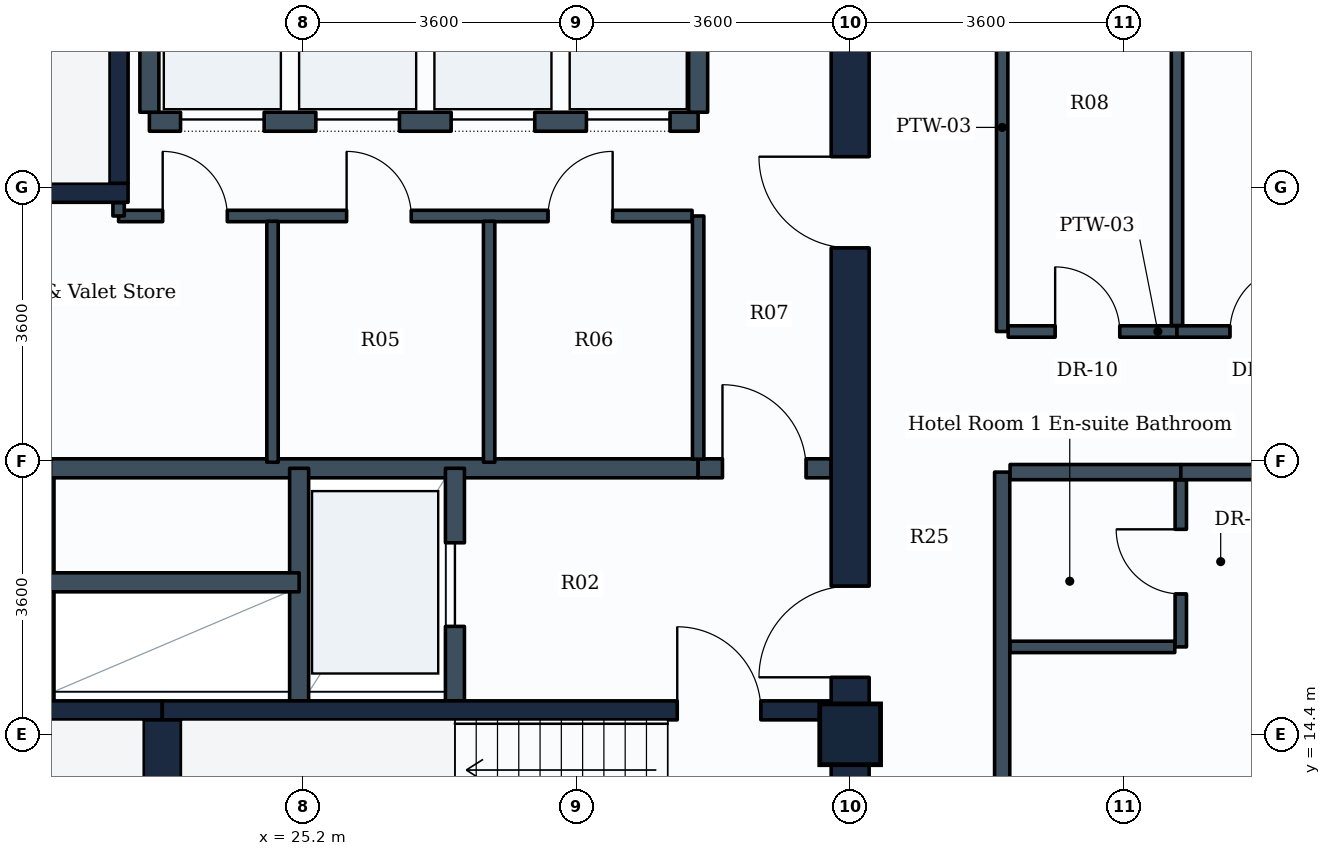
"""IFC4 building model, lengths in metres.
Left out: names, types, materials, properties, quantities, classifications, styles, units other than length and angle.
Written with IfcOpenShell. Run it as: python <this file> out.ifc"""

import sys

from ifc_helpers import new_model, si_unit, direction, frame, frame_2d, origin, origin_2d, place, context, subcontext, project, spatial, rectangle, extrude, element, fill, save


model = new_model("IFC4")
c1 = context("Model", 3, precision=1e-05, world=origin(), true_north=direction((0.0, 1.0)))
c2 = subcontext(c1, "Body", "Model", "MODEL_VIEW")
j1 = project(units=[si_unit("LENGTHUNIT", "METRE"), si_unit("PLANEANGLEUNIT", "RADIAN")], contexts=[c1])
p1 = place(None, origin())
s1 = spatial("IfcSite", under=j1, at=p1, CompositionType="ELEMENT")
p2 = place(p1, origin())
s2 = spatial("IfcBuilding", under=s1, at=p2, CompositionType="ELEMENT")
p3 = place(p2, frame((0.0, 0.0, 217.4)))
s3 = spatial("IfcBuildingStorey", under=s2, at=p3, CompositionType="ELEMENT", Elevation=217.4)
p4 = place(p3, frame((32.4, 14.4, 0.0), z_axis=(0.0, 0.0, 1.0), x_axis=(1.0, 0.0, 0.0)))
e1 = element("IfcColumn", 1, at=p4, inside=s3, PredefinedType="COLUMN", context=c2, shape_type="SweptSolid", body=[
    extrude(rectangle(XDim=0.8, YDim=0.8, at=origin_2d()), origin(), (0.0, 0.0, 1.0), 3.6),
])
p5 = place(p3, frame((32.4, 10.8, 0.0), z_axis=(0.0, 0.0, 1.0), x_axis=(0.0, 1.0, 0.0)))
e2 = element("IfcWall", 2, at=p5, inside=s3, PredefinedType="SHEAR", context=c2, shape_type="SweptSolid", body=[
    extrude(rectangle(XDim=14.4, YDim=0.5, at=frame_2d((7.2, 0.0))), origin(), (0.0, 0.0, 1.0), 3.28),
])
p6 = place(p5, frame((4.35, 0.0, 0.0)))
e3 = element("IfcOpeningElement", 3, at=p6, cuts=e2, PredefinedType="OPENING", context=c2, shape_type="SweptSolid", body=[
    extrude(rectangle(XDim=1.2, YDim=2.1, at=frame_2d((0.6, 1.05))), frame((0.0, 0.26, 0.0), z_axis=(0.0, -1.0, 0.0), x_axis=(1.0, 0.0, 0.0)), (0.0, 0.0, 1.0), 0.52),
])
p7 = place(p5, frame((10.0, 0.0, 0.0)))
e4 = element("IfcOpeningElement", 4, at=p7, cuts=e2, PredefinedType="OPENING", context=c2, shape_type="SweptSolid", body=[
    extrude(rectangle(XDim=1.2, YDim=2.1, at=frame_2d((0.6, 1.05))), frame((0.0, 0.26, 0.0), z_axis=(0.0, -1.0, 0.0), x_axis=(1.0, 0.0, 0.0)), (0.0, 0.0, 1.0), 0.52),
])
p8 = place(p3, frame((14.65, 14.715, 0.0), z_axis=(0.0, 0.0, 1.0), x_axis=(1.0, 0.0, 0.0)))
e5 = element("IfcWall", 5, at=p8, inside=s3, PredefinedType="SHEAR", context=c2, shape_type="SweptSolid", body=[
    extrude(rectangle(XDim=8.7, YDim=0.25, at=frame_2d((4.35, 0.0))), origin(), (0.0, 0.0, 1.0), 3.28),
])
p9 = place(p8, frame((0.705, 0.0, 0.0)))
e6 = element("IfcOpeningElement", 6, at=p9, cuts=e5, PredefinedType="OPENING", context=c2, shape_type="SweptSolid", body=[
    extrude(rectangle(XDim=1.1, YDim=2.1, at=frame_2d((0.55, 1.05))), frame((0.0, 0.135, 0.0), z_axis=(0.0, -1.0, 0.0), x_axis=(1.0, 0.0, 0.0)), (0.0, 0.0, 1.0), 0.27),
])
p10 = place(p3, frame((23.35, 14.715, 0.0), z_axis=(0.0, 0.0, 1.0), x_axis=(1.0, 0.0, 0.0)))
e7 = element("IfcWall", 7, at=p10, inside=s3, PredefinedType="SHEAR", context=c2, shape_type="SweptSolid", body=[
    extrude(rectangle(XDim=8.8, YDim=0.25, at=frame_2d((4.4, 0.0))), origin(), (0.0, 0.0, 1.0), 3.28),
])
p11 = place(p10, frame((6.775, 0.0, 0.0)))
e8 = element("IfcOpeningElement", 8, at=p11, cuts=e7, PredefinedType="OPENING", context=c2, shape_type="SweptSolid", body=[
    extrude(rectangle(XDim=1.1, YDim=2.1, at=frame_2d((0.55, 1.05))), frame((0.0, 0.135, 0.0), z_axis=(0.0, -1.0, 0.0), x_axis=(1.0, 0.0, 0.0)), (0.0, 0.0, 1.0), 0.27),
])
p12 = place(p3, frame((23.35, 11.75, 0.0), z_axis=(0.0, 0.0, 1.0), x_axis=(0.0, 1.0, 0.0)))
e9 = element("IfcWall", 9, at=p12, inside=s3, PredefinedType="SHEAR", context=c2, shape_type="SweptSolid", body=[
    extrude(rectangle(XDim=2.84, YDim=0.5, at=frame_2d((1.42, 0.0))), origin(), (0.0, 0.0, 1.0), 3.28),
])
p13 = place(p3, frame((14.65, 21.525, 0.0), z_axis=(0.0, 0.0, 1.0), x_axis=(1.0, 0.0, 0.0)))
e10 = element("IfcWall", 10, at=p13, inside=s3, PredefinedType="SHEAR", context=c2, shape_type="SweptSolid", body=[
    extrude(rectangle(XDim=8.25, YDim=0.25, at=frame_2d((4.125, 0.0))), origin(), (0.0, 0.0, 1.0), 3.28),
])
p14 = place(p3, frame((22.775, 21.65, 0.0), z_axis=(0.0, 0.0, 1.0), x_axis=(0.0, 1.0, 0.0)))
e11 = element("IfcWall", 11, at=p14, inside=s3, PredefinedType="SHEAR", context=c2, shape_type="SweptSolid", body=[
    extrude(rectangle(XDim=2.84, YDim=0.25, at=frame_2d((1.42, 0.0))), origin(), (0.0, 0.0, 1.0), 3.28),
])
p15 = place(p3, frame((21.8, 14.84, 0.0), z_axis=(0.0, 0.0, 1.0), x_axis=(0.0, 1.0, 0.0)))
e12 = element("IfcWall", 12, at=p15, inside=s3, PredefinedType="PARTITIONING", context=c2, shape_type="SweptSolid", body=[
    extrude(rectangle(XDim=3.06, YDim=0.25, at=frame_2d((1.53, 0.0))), origin(), (0.0, 0.0, 1.0), 3.265),
])
p16 = place(p3, frame((21.88, 17.9, 0.0), z_axis=(0.0, 0.0, 1.0), x_axis=(1.0, 0.0, 0.0)))
e13 = element("IfcWall", 13, at=p16, inside=s3, PredefinedType="PARTITIONING", context=c2, shape_type="SweptSolid", body=[
    extrude(rectangle(XDim=8.52, YDim=0.25, at=frame_2d((4.26, 0.0))), origin(), (0.0, 0.0, 1.0), 3.265),
])
p17 = place(p3, frame((30.4, 17.9, 0.0), z_axis=(0.0, 0.0, 1.0), x_axis=(1.0, 0.0, 0.0)))
e14 = element("IfcWall", 14, at=p17, inside=s3, PredefinedType="PARTITIONING", context=c2, shape_type="SweptSolid", body=[
    extrude(rectangle(XDim=1.75, YDim=0.25, at=frame_2d((0.875, 0.0))), origin(), (0.0, 0.0, 1.0), 3.265),
])
p18 = place(p17, frame((0.32, 0.0, 0.0)))
e15 = element("IfcOpeningElement", 15, at=p18, cuts=e14, PredefinedType="OPENING", context=c2, shape_type="SweptSolid", body=[
    extrude(rectangle(XDim=1.1, YDim=2.1, at=frame_2d((0.55, 1.05))), frame((0.0, 0.135, 0.0), z_axis=(0.0, -1.0, 0.0), x_axis=(1.0, 0.0, 0.0)), (0.0, 0.0, 1.0), 0.27),
])
p19 = place(p3, frame((25.15, 14.84, 0.0), z_axis=(0.0, 0.0, 1.0), x_axis=(0.0, 1.0, 0.0)))
e16 = element("IfcWall", 16, at=p19, inside=s3, PredefinedType="PARTITIONING", context=c2, shape_type="SweptSolid", body=[
    extrude(rectangle(XDim=3.06, YDim=0.25, at=frame_2d((1.53, 0.0))), origin(), (0.0, 0.0, 1.0), 3.265),
])
p20 = place(p3, frame((27.2, 14.84, 0.0), z_axis=(0.0, 0.0, 1.0), x_axis=(0.0, 1.0, 0.0)))
e17 = element("IfcWall", 17, at=p20, inside=s3, PredefinedType="PARTITIONING", context=c2, shape_type="SweptSolid", body=[
    extrude(rectangle(XDim=3.06, YDim=0.25, at=frame_2d((1.53, 0.0))), origin(), (0.0, 0.0, 1.0), 3.265),
])
p21 = place(p20, frame((0.98, 0.0, 0.0)))
e18 = element("IfcOpeningElement", 18, at=p21, cuts=e17, PredefinedType="OPENING", context=c2, shape_type="SweptSolid", body=[
    extrude(rectangle(XDim=1.1, YDim=2.1, at=frame_2d((0.55, 1.05))), frame((0.0, 0.135, 0.0), z_axis=(0.0, -1.0, 0.0), x_axis=(1.0, 0.0, 0.0)), (0.0, 0.0, 1.0), 0.27),
])
p22 = place(p3, frame((21.8, 16.4, 0.0), z_axis=(0.0, 0.0, 1.0), x_axis=(1.0, 0.0, 0.0)))
e19 = element("IfcWall", 19, at=p22, inside=s3, PredefinedType="PARTITIONING", context=c2, shape_type="SweptSolid", body=[
    extrude(rectangle(XDim=3.35, YDim=0.25, at=frame_2d((1.675, 0.0))), origin(), (0.0, 0.0, 1.0), 3.265),
])
p23 = place(p3, frame((23.18, 22.46, 0.0), z_axis=(0.0, 0.0, 1.0), x_axis=(1.0, 0.0, 0.0)))
e20 = element("IfcWall", 20, at=p23, inside=s3, PredefinedType="PARTITIONING", context=c2, shape_type="SweptSolid", body=[
    extrude(rectangle(XDim=7.22, YDim=0.25, at=frame_2d((3.61, 0.0))), origin(), (0.0, 0.0, 1.0), 3.265),
])
p24 = place(p23, frame((0.41, 0.0, 0.0)))
e21 = element("IfcOpeningElement", 21, at=p24, cuts=e20, PredefinedType="OPENING", context=c2, shape_type="SweptSolid", body=[
    extrude(rectangle(XDim=1.1, YDim=2.1, at=frame_2d((0.55, 1.05))), frame((0.0, 0.135, 0.0), z_axis=(0.0, -1.0, 0.0), x_axis=(1.0, 0.0, 0.0)), (0.0, 0.0, 1.0), 0.27),
])
p25 = place(p23, frame((2.19, 0.0, 0.0)))
e22 = element("IfcOpeningElement", 22, at=p25, cuts=e20, PredefinedType="OPENING", context=c2, shape_type="SweptSolid", body=[
    extrude(rectangle(XDim=1.1, YDim=2.1, at=frame_2d((0.55, 1.05))), frame((0.0, 0.135, 0.0), z_axis=(0.0, -1.0, 0.0), x_axis=(1.0, 0.0, 0.0)), (0.0, 0.0, 1.0), 0.27),
])
p26 = place(p23, frame((3.97, 0.0, 0.0)))
e23 = element("IfcOpeningElement", 23, at=p26, cuts=e20, PredefinedType="OPENING", context=c2, shape_type="SweptSolid", body=[
    extrude(rectangle(XDim=1.1, YDim=2.1, at=frame_2d((0.55, 1.05))), frame((0.0, 0.135, 0.0), z_axis=(0.0, -1.0, 0.0), x_axis=(1.0, 0.0, 0.0)), (0.0, 0.0, 1.0), 0.27),
])
p27 = place(p23, frame((5.75, 0.0, 0.0)))
e24 = element("IfcOpeningElement", 24, at=p27, cuts=e20, PredefinedType="OPENING", context=c2, shape_type="SweptSolid", body=[
    extrude(rectangle(XDim=1.1, YDim=2.1, at=frame_2d((0.55, 1.05))), frame((0.0, 0.135, 0.0), z_axis=(0.0, -1.0, 0.0), x_axis=(1.0, 0.0, 0.0)), (0.0, 0.0, 1.0), 0.27),
])
for number, where, z_axis, x_axis in (
    (25, (23.18, 22.585, 0.0), (0.0, 0.0, 1.0), (0.0, 1.0, 0.0)),
    (26, (30.4, 22.585, 0.0), (0.0, 0.0, 1.0), (0.0, 1.0, 0.0)),
):
    element("IfcWall", number, at=place(p3, frame(where, z_axis=z_axis, x_axis=x_axis)), inside=s3, PredefinedType="PARTITIONING", context=c2, shape_type="SweptSolid", body=[
        extrude(rectangle(XDim=2.315, YDim=0.25, at=frame_2d((1.157, 0.0))), origin(), (0.0, 0.0, 1.0), 3.265),
    ])
p28 = place(p3, frame((22.775, 21.22, 0.0), z_axis=(0.0, 0.0, 1.0), x_axis=(1.0, 0.0, 0.0)))
e27 = element("IfcWall", 27, at=p28, inside=s3, PredefinedType="PARTITIONING", context=c2, shape_type="SweptSolid", body=[
    extrude(rectangle(XDim=7.545, YDim=0.15, at=frame_2d((3.772, 0.0))), origin(), (0.0, 0.0, 1.0), 3.265),
])
p29 = place(p28, frame((0.58, 0.0, 0.0)))
e28 = element("IfcOpeningElement", 28, at=p29, cuts=e27, PredefinedType="OPENING", context=c2, shape_type="SweptSolid", body=[
    extrude(rectangle(XDim=0.85, YDim=2.1, at=frame_2d((0.425, 1.05))), frame((0.0, 0.085, 0.0), z_axis=(0.0, -1.0, 0.0), x_axis=(1.0, 0.0, 0.0)), (0.0, 0.0, 1.0), 0.17),
])
p30 = place(p28, frame((3.0, 0.0, 0.0)))
e29 = element("IfcOpeningElement", 29, at=p30, cuts=e27, PredefinedType="OPENING", context=c2, shape_type="SweptSolid", body=[
    extrude(rectangle(XDim=0.85, YDim=2.1, at=frame_2d((0.425, 1.05))), frame((0.0, 0.085, 0.0), z_axis=(0.0, -1.0, 0.0), x_axis=(1.0, 0.0, 0.0)), (0.0, 0.0, 1.0), 0.17),
])
p31 = place(p28, frame((5.65, 0.0, 0.0)))
e30 = element("IfcOpeningElement", 30, at=p31, cuts=e27, PredefinedType="OPENING", context=c2, shape_type="SweptSolid", body=[
    extrude(rectangle(XDim=0.85, YDim=2.1, at=frame_2d((0.425, 1.05))), frame((0.0, 0.085, 0.0), z_axis=(0.0, -1.0, 0.0), x_axis=(1.0, 0.0, 0.0)), (0.0, 0.0, 1.0), 0.17),
])
p32 = place(p3, frame((22.775, 21.22, 0.0), z_axis=(0.0, 0.0, 1.0), x_axis=(0.0, 1.0, 0.0)))
e31 = element("IfcWall", 31, at=p32, inside=s3, PredefinedType="PARTITIONING", context=c2, shape_type="SweptSolid", body=[
    extrude(rectangle(XDim=0.175, YDim=0.15, at=frame_2d((0.087, 0.0))), origin(), (0.0, 0.0, 1.0), 3.265),
])
p33 = place(p3, frame((30.4, 18.02, 0.0), z_axis=(0.0, 0.0, 1.0), x_axis=(0.0, 1.0, 0.0)))
e32 = element("IfcWall", 32, at=p33, inside=s3, PredefinedType="PARTITIONING", context=c2, shape_type="SweptSolid", body=[
    extrude(rectangle(XDim=3.2, YDim=0.15, at=frame_2d((1.6, 0.0))), origin(), (0.0, 0.0, 1.0), 3.265),
])
for number, where, z_axis, x_axis in (
    (33, (24.8, 17.98, 0.0), (0.0, 0.0, 1.0), (0.0, 1.0, 0.0)),
    (34, (27.65, 17.98, 0.0), (0.0, 0.0, 1.0), (0.0, 1.0, 0.0)),
):
    element("IfcWall", number, at=place(p3, frame(where, z_axis=z_axis, x_axis=x_axis)), inside=s3, PredefinedType="PARTITIONING", context=c2, shape_type="SweptSolid", body=[
        extrude(rectangle(XDim=3.17, YDim=0.15, at=frame_2d((1.585, 0.0))), origin(), (0.0, 0.0, 1.0), 3.265),
    ])
p34 = place(p3, frame((34.4, 19.7, 0.0), z_axis=(0.0, 0.0, 1.0), x_axis=(0.0, 1.0, 0.0)))
e35 = element("IfcWall", 35, at=p34, inside=s3, PredefinedType="PARTITIONING", context=c2, shape_type="SweptSolid", body=[
    extrude(rectangle(XDim=5.371, YDim=0.15, at=frame_2d((2.686, 0.0))), origin(), (0.0, 0.0, 1.0), 2.83),
])
p35 = place(p3, frame((34.479, 19.7, 0.0), z_axis=(0.0, 0.0, 1.0), x_axis=(1.0, 0.0, 0.0)))
e36 = element("IfcWall", 36, at=p35, inside=s3, PredefinedType="PARTITIONING", context=c2, shape_type="SweptSolid", body=[
    extrude(rectangle(XDim=2.221, YDim=0.15, at=frame_2d((1.11, 0.0))), origin(), (0.0, 0.0, 1.0), 2.96),
])
p36 = place(p35, frame((0.618, 0.0, 0.0)))
e37 = element("IfcOpeningElement", 37, at=p36, cuts=e36, PredefinedType="OPENING", context=c2, shape_type="SweptSolid", body=[
    extrude(rectangle(XDim=0.85, YDim=2.1, at=frame_2d((0.425, 1.05))), frame((0.0, 0.085, 0.0), z_axis=(0.0, -1.0, 0.0), x_axis=(1.0, 0.0, 0.0)), (0.0, 0.0, 1.0), 0.17),
])
p37 = place(p3, frame((36.7, 19.779, 0.0), z_axis=(0.0, 0.0, 1.0), x_axis=(0.0, 1.0, 0.0)))
e38 = element("IfcWall", 38, at=p37, inside=s3, PredefinedType="PARTITIONING", context=c2, shape_type="SweptSolid", body=[
    extrude(rectangle(XDim=5.292, YDim=0.15, at=frame_2d((2.646, 0.0))), origin(), (0.0, 0.0, 1.0), 2.83),
])
p38 = place(p3, frame((36.7, 19.7, 0.0), z_axis=(0.0, 0.0, 1.0), x_axis=(1.0, 0.0, 0.0)))
e39 = element("IfcWall", 39, at=p38, inside=s3, PredefinedType="PARTITIONING", context=c2, shape_type="SweptSolid", body=[
    extrude(rectangle(XDim=2.3, YDim=0.15, at=frame_2d((1.15, 0.0))), origin(), (0.0, 0.0, 1.0), 3.265),
])
p39 = place(p38, frame((0.697, 0.0, 0.0)))
e40 = element("IfcOpeningElement", 40, at=p39, cuts=e39, PredefinedType="OPENING", context=c2, shape_type="SweptSolid", body=[
    extrude(rectangle(XDim=0.85, YDim=2.1, at=frame_2d((0.425, 1.05))), frame((0.0, 0.085, 0.0), z_axis=(0.0, -1.0, 0.0), x_axis=(1.0, 0.0, 0.0)), (0.0, 0.0, 1.0), 0.17),
])
p40 = place(p3, frame((34.4, 3.729, 0.0), z_axis=(0.0, 0.0, 1.0), x_axis=(0.0, 1.0, 0.0)))
e41 = element("IfcWall", 41, at=p40, inside=s3, PredefinedType="PARTITIONING", context=c2, shape_type="SweptSolid", body=[
    extrude(rectangle(XDim=14.121, YDim=0.2, at=frame_2d((7.061, 0.0))), origin(), (0.0, 0.0, 1.0), 2.23),
])
p41 = place(p3, frame((34.504, 17.85, 0.0), z_axis=(0.0, 0.0, 1.0), x_axis=(1.0, 0.0, 0.0)))
e42 = element("IfcWall", 42, at=p41, inside=s3, PredefinedType="PARTITIONING", context=c2, shape_type="SweptSolid", body=[
    extrude(rectangle(XDim=2.246, YDim=0.2, at=frame_2d((1.123, 0.0))), origin(), (0.0, 0.0, 1.0), 2.96),
])
p42 = place(p3, frame((36.75, 17.85, 0.0), z_axis=(0.0, 0.0, 1.0), x_axis=(1.0, 0.0, 0.0)))
e43 = element("IfcWall", 43, at=p42, inside=s3, PredefinedType="PARTITIONING", context=c2, shape_type="SweptSolid", body=[
    extrude(rectangle(XDim=4.496, YDim=0.2, at=frame_2d((2.248, 0.0))), origin(), (0.0, 0.0, 1.0), 3.265),
])
p43 = place(p42, frame((1.761, 0.0, 0.0)))
e44 = element("IfcOpeningElement", 44, at=p43, cuts=e43, PredefinedType="OPENING", context=c2, shape_type="SweptSolid", body=[
    extrude(rectangle(XDim=1.0, YDim=2.1, at=frame_2d((0.5, 1.05))), frame((0.0, 0.11, 0.0), z_axis=(0.0, -1.0, 0.0), x_axis=(1.0, 0.0, 0.0)), (0.0, 0.0, 1.0), 0.22),
])
p44 = place(p3, frame((36.75, 15.55, 0.0), z_axis=(0.0, 0.0, 1.0), x_axis=(0.0, 1.0, 0.0)))
e45 = element("IfcWall", 45, at=p44, inside=s3, PredefinedType="PARTITIONING", context=c2, shape_type="SweptSolid", body=[
    extrude(rectangle(XDim=2.196, YDim=0.15, at=frame_2d((1.098, 0.0))), origin(), (0.0, 0.0, 1.0), 3.265),
])
p45 = place(p44, frame((0.697, 0.0, 0.0)))
e46 = element("IfcOpeningElement", 46, at=p45, cuts=e45, PredefinedType="OPENING", context=c2, shape_type="SweptSolid", body=[
    extrude(rectangle(XDim=0.85, YDim=2.1, at=frame_2d((0.425, 1.05))), frame((0.0, 0.085, 0.0), z_axis=(0.0, -1.0, 0.0), x_axis=(1.0, 0.0, 0.0)), (0.0, 0.0, 1.0), 0.17),
])
p46 = place(p3, frame((34.504, 15.55, 0.0), z_axis=(0.0, 0.0, 1.0), x_axis=(1.0, 0.0, 0.0)))
e47 = element("IfcWall", 47, at=p46, inside=s3, PredefinedType="PARTITIONING", context=c2, shape_type="SweptSolid", body=[
    extrude(rectangle(XDim=2.167, YDim=0.15, at=frame_2d((1.083, 0.0))), origin(), (0.0, 0.0, 1.0), 2.96),
])
p47 = place(p11, origin())
e48 = element("IfcDoor", 48, at=p47, inside=s3, OperationType="SINGLE_SWING_LEFT", PredefinedType="DOOR", context=c2, shape_type="SweptSolid", body=[
    extrude(rectangle(XDim=1.1, YDim=2.1, at=frame_2d((0.55, 1.05))), frame((0.0, 0.025, 0.0), z_axis=(0.0, -1.0, 0.0), x_axis=(1.0, 0.0, 0.0)), (0.0, 0.0, 1.0), 0.05),
])
fill(e8, e48)
p48 = place(p21, origin())
e49 = element("IfcDoor", 49, at=p48, inside=s3, OperationType="SLIDING_TO_LEFT", PredefinedType="DOOR", context=c2, shape_type="SweptSolid", body=[
    extrude(rectangle(XDim=1.1, YDim=2.1, at=frame_2d((0.55, 1.05))), frame((0.0, 0.025, 0.0), z_axis=(0.0, -1.0, 0.0), x_axis=(1.0, 0.0, 0.0)), (0.0, 0.0, 1.0), 0.05),
])
fill(e18, e49)
p49 = place(p6, origin())
e50 = element("IfcDoor", 50, at=p49, inside=s3, OperationType="SINGLE_SWING_LEFT", PredefinedType="DOOR", context=c2, shape_type="SweptSolid", body=[
    extrude(rectangle(XDim=1.2, YDim=2.1, at=frame_2d((0.6, 1.05))), frame((0.0, 0.025, 0.0), z_axis=(0.0, -1.0, 0.0), x_axis=(1.0, 0.0, 0.0)), (0.0, 0.0, 1.0), 0.05),
])
fill(e3, e50)
p50 = place(p18, origin())
e51 = element("IfcDoor", 51, at=p50, inside=s3, OperationType="SINGLE_SWING_LEFT", PredefinedType="DOOR", context=c2, shape_type="SweptSolid", body=[
    extrude(rectangle(XDim=1.1, YDim=2.1, at=frame_2d((0.55, 1.05))), frame((0.0, 0.025, 0.0), z_axis=(0.0, -1.0, 0.0), x_axis=(1.0, 0.0, 0.0)), (0.0, 0.0, 1.0), 0.05),
])
fill(e15, e51)
p51 = place(p24, origin())
e52 = element("IfcDoor", 52, at=p51, inside=s3, OperationType="SLIDING_TO_LEFT", PredefinedType="DOOR", context=c2, shape_type="SweptSolid", body=[
    extrude(rectangle(XDim=1.1, YDim=2.1, at=frame_2d((0.55, 1.05))), frame((0.0, 0.025, 0.0), z_axis=(0.0, -1.0, 0.0), x_axis=(1.0, 0.0, 0.0)), (0.0, 0.0, 1.0), 0.05),
])
fill(e21, e52)
p52 = place(p25, origin())
e53 = element("IfcDoor", 53, at=p52, inside=s3, OperationType="SLIDING_TO_LEFT", PredefinedType="DOOR", context=c2, shape_type="SweptSolid", body=[
    extrude(rectangle(XDim=1.1, YDim=2.1, at=frame_2d((0.55, 1.05))), frame((0.0, 0.025, 0.0), z_axis=(0.0, -1.0, 0.0), x_axis=(1.0, 0.0, 0.0)), (0.0, 0.0, 1.0), 0.05),
])
fill(e22, e53)
p53 = place(p26, origin())
e54 = element("IfcDoor", 54, at=p53, inside=s3, OperationType="SLIDING_TO_LEFT", PredefinedType="DOOR", context=c2, shape_type="SweptSolid", body=[
    extrude(rectangle(XDim=1.1, YDim=2.1, at=frame_2d((0.55, 1.05))), frame((0.0, 0.025, 0.0), z_axis=(0.0, -1.0, 0.0), x_axis=(1.0, 0.0, 0.0)), (0.0, 0.0, 1.0), 0.05),
])
fill(e23, e54)
p54 = place(p27, origin())
e55 = element("IfcDoor", 55, at=p54, inside=s3, OperationType="SLIDING_TO_LEFT", PredefinedType="DOOR", context=c2, shape_type="SweptSolid", body=[
    extrude(rectangle(XDim=1.1, YDim=2.1, at=frame_2d((0.55, 1.05))), frame((0.0, 0.025, 0.0), z_axis=(0.0, -1.0, 0.0), x_axis=(1.0, 0.0, 0.0)), (0.0, 0.0, 1.0), 0.05),
])
fill(e24, e55)
p55 = place(p7, origin())
e56 = element("IfcDoor", 56, at=p55, inside=s3, OperationType="SINGLE_SWING_RIGHT", PredefinedType="DOOR", context=c2, shape_type="SweptSolid", body=[
    extrude(rectangle(XDim=1.2, YDim=2.1, at=frame_2d((0.6, 1.05))), frame((0.0, 0.025, 0.0), z_axis=(0.0, -1.0, 0.0), x_axis=(1.0, 0.0, 0.0)), (0.0, 0.0, 1.0), 0.05),
])
fill(e4, e56)
p56 = place(p29, origin())
e57 = element("IfcDoor", 57, at=p56, inside=s3, OperationType="SINGLE_SWING_LEFT", PredefinedType="DOOR", context=c2, shape_type="SweptSolid", body=[
    extrude(rectangle(XDim=0.85, YDim=2.1, at=frame_2d((0.425, 1.05))), frame((0.0, 0.025, 0.0), z_axis=(0.0, -1.0, 0.0), x_axis=(1.0, 0.0, 0.0)), (0.0, 0.0, 1.0), 0.05),
])
fill(e28, e57)
p57 = place(p30, origin())
e58 = element("IfcDoor", 58, at=p57, inside=s3, OperationType="SINGLE_SWING_LEFT", PredefinedType="DOOR", context=c2, shape_type="SweptSolid", body=[
    extrude(rectangle(XDim=0.85, YDim=2.1, at=frame_2d((0.425, 1.05))), frame((0.0, 0.025, 0.0), z_axis=(0.0, -1.0, 0.0), x_axis=(1.0, 0.0, 0.0)), (0.0, 0.0, 1.0), 0.05),
])
fill(e29, e58)
p58 = place(p31, origin())
e59 = element("IfcDoor", 59, at=p58, inside=s3, OperationType="SINGLE_SWING_RIGHT", PredefinedType="DOOR", context=c2, shape_type="SweptSolid", body=[
    extrude(rectangle(XDim=0.85, YDim=2.1, at=frame_2d((0.425, 1.05))), frame((0.0, 0.025, 0.0), z_axis=(0.0, -1.0, 0.0), x_axis=(1.0, 0.0, 0.0)), (0.0, 0.0, 1.0), 0.05),
])
fill(e30, e59)
p59 = place(p36, origin())
e60 = element("IfcDoor", 60, at=p59, inside=s3, OperationType="SINGLE_SWING_LEFT", PredefinedType="DOOR", context=c2, shape_type="SweptSolid", body=[
    extrude(rectangle(XDim=0.85, YDim=2.1, at=frame_2d((0.425, 1.05))), frame((0.0, 0.025, 0.0), z_axis=(0.0, -1.0, 0.0), x_axis=(1.0, 0.0, 0.0)), (0.0, 0.0, 1.0), 0.05),
])
fill(e37, e60)
p60 = place(p39, origin())
e61 = element("IfcDoor", 61, at=p60, inside=s3, OperationType="SINGLE_SWING_RIGHT", PredefinedType="DOOR", context=c2, shape_type="SweptSolid", body=[
    extrude(rectangle(XDim=0.85, YDim=2.1, at=frame_2d((0.425, 1.05))), frame((0.0, 0.025, 0.0), z_axis=(0.0, -1.0, 0.0), x_axis=(1.0, 0.0, 0.0)), (0.0, 0.0, 1.0), 0.05),
])
fill(e40, e61)
p61 = place(p45, origin())
e62 = element("IfcDoor", 62, at=p61, inside=s3, OperationType="SINGLE_SWING_RIGHT", PredefinedType="DOOR", context=c2, shape_type="SweptSolid", body=[
    extrude(rectangle(XDim=0.85, YDim=2.1, at=frame_2d((0.425, 1.05))), frame((0.0, 0.025, 0.0), z_axis=(0.0, -1.0, 0.0), x_axis=(1.0, 0.0, 0.0)), (0.0, 0.0, 1.0), 0.05),
])
fill(e46, e62)
save(model, sys.argv[1])
